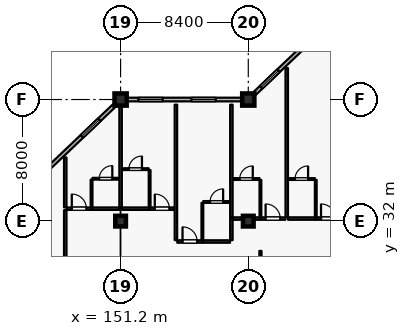
"""IFC4 building model, lengths in metres.
Left out: names, types, materials, properties, quantities, classifications, styles, units other than length and angle.
Written with IfcOpenShell. Run it as: python <this file> out.ifc"""

import sys

from ifc_helpers import new_model, si_unit, direction, frame, frame_2d, origin, origin_2d, place, context, subcontext, project, spatial, rectangle, extrude, element, fill, save


model = new_model("IFC4")
c1 = context("Model", 3, precision=1e-05, world=origin(), true_north=direction((0.0, 1.0)))
c2 = subcontext(c1, "Body", "Model", "MODEL_VIEW")
j1 = project(units=[si_unit("LENGTHUNIT", "METRE"), si_unit("PLANEANGLEUNIT", "RADIAN")], contexts=[c1])
p1 = place(None, origin())
s1 = spatial("IfcSite", under=j1, at=p1, CompositionType="ELEMENT")
p2 = place(p1, origin())
s2 = spatial("IfcBuilding", under=s1, at=p2, CompositionType="ELEMENT")
p3 = place(p2, frame((0.0, 0.0, 11.4)))
s3 = spatial("IfcBuildingStorey", under=s2, at=p3, CompositionType="ELEMENT", Elevation=11.4)
for number, where, z_axis, x_axis in (
    (1, (151.2, 40.0, 0.0), (0.0, 0.0, 1.0), (1.0, 0.0, 0.0)),
    (2, (159.6, 40.0, 0.0), (0.0, 0.0, 1.0), (1.0, 0.0, 0.0)),
):
    element("IfcColumn", number, at=place(p3, frame(where, z_axis=z_axis, x_axis=x_axis)), inside=s3, PredefinedType="COLUMN", context=c2, shape_type="SweptSolid", body=[
        extrude(rectangle(XDim=0.8, YDim=0.8, at=origin_2d()), origin(), (0.0, 0.0, 1.0), 4.8),
    ])
for number, where, z_axis, x_axis in (
    (3, (151.2, 32.0, 0.0), (0.0, 0.0, 1.0), (1.0, 0.0, 0.0)),
    (4, (159.6, 32.0, 0.0), (0.0, 0.0, 1.0), (1.0, 0.0, 0.0)),
):
    element("IfcColumn", number, at=place(p3, frame(where, z_axis=z_axis, x_axis=x_axis)), inside=s3, PredefinedType="COLUMN", context=c2, shape_type="SweptSolid", body=[
        extrude(rectangle(XDim=0.7, YDim=0.7, at=origin_2d()), origin(), (0.0, 0.0, 1.0), 4.8),
    ])
p4 = place(p3, frame((143.2, 32.381, 0.0), z_axis=(0.0, 0.0, 1.0), x_axis=(0.724156739794, 0.689635422677, 0.0)))
e5 = element("IfcWall", 5, at=p4, inside=s3, PredefinedType="SOLIDWALL", context=c2, shape_type="SweptSolid", body=[
    extrude(rectangle(XDim=10.495, YDim=0.24, at=frame_2d((5.248, 0.0))), origin(), (0.0, 0.0, 1.0), 4.13),
])
p5 = place(p4, frame((2.701, 0.0, 0.8)))
e6 = element("IfcOpeningElement", 6, at=p5, cuts=e5, PredefinedType="OPENING", context=c2, shape_type="SweptSolid", body=[
    extrude(rectangle(XDim=1.6, YDim=1.6, at=frame_2d((0.8, 0.8))), frame((0.0, 0.13, 0.0), z_axis=(0.0, -1.0, 0.0), x_axis=(1.0, 0.0, 0.0)), (0.0, 0.0, 1.0), 0.26),
])
p6 = place(p4, frame((7.527, 0.0, 0.8)))
e7 = element("IfcOpeningElement", 7, at=p6, cuts=e5, PredefinedType="OPENING", context=c2, shape_type="SweptSolid", body=[
    extrude(rectangle(XDim=1.6, YDim=1.6, at=frame_2d((0.8, 0.8))), frame((0.0, 0.13, 0.0), z_axis=(0.0, -1.0, 0.0), x_axis=(1.0, 0.0, 0.0)), (0.0, 0.0, 1.0), 0.26),
])
p7 = place(p3, frame((151.6, 40.0, 0.0), z_axis=(0.0, 0.0, 1.0), x_axis=(1.0, 0.0, 0.0)))
e8 = element("IfcWall", 8, at=p7, inside=s3, PredefinedType="SOLIDWALL", context=c2, shape_type="SweptSolid", body=[
    extrude(rectangle(XDim=7.6, YDim=0.24, at=frame_2d((3.8, 0.0))), origin(), (0.0, 0.0, 1.0), 4.13),
])
p8 = place(p7, frame((0.77, 0.0, 0.8)))
e9 = element("IfcOpeningElement", 9, at=p8, cuts=e8, PredefinedType="OPENING", context=c2, shape_type="SweptSolid", body=[
    extrude(rectangle(XDim=1.6, YDim=1.6, at=frame_2d((0.8, 0.8))), frame((0.0, 0.13, 0.0), z_axis=(0.0, -1.0, 0.0), x_axis=(1.0, 0.0, 0.0)), (0.0, 0.0, 1.0), 0.26),
])
p9 = place(p7, frame((4.265, 0.0, 0.8)))
e10 = element("IfcOpeningElement", 10, at=p9, cuts=e8, PredefinedType="OPENING", context=c2, shape_type="SweptSolid", body=[
    extrude(rectangle(XDim=1.6, YDim=1.6, at=frame_2d((0.8, 0.8))), frame((0.0, 0.13, 0.0), z_axis=(0.0, -1.0, 0.0), x_axis=(1.0, 0.0, 0.0)), (0.0, 0.0, 1.0), 0.26),
])
p10 = place(p3, frame((160.0, 40.381, 0.0), z_axis=(0.0, 0.0, 1.0), x_axis=(0.724156739794, 0.689635422677, 0.0)))
e11 = element("IfcWall", 11, at=p10, inside=s3, PredefinedType="SOLIDWALL", context=c2, shape_type="SweptSolid", body=[
    extrude(rectangle(XDim=10.495, YDim=0.24, at=frame_2d((5.248, 0.0))), origin(), (0.0, 0.0, 1.0), 4.13),
])
p11 = place(p10, frame((0.602, 0.0, 0.8)))
e12 = element("IfcOpeningElement", 12, at=p11, cuts=e11, PredefinedType="OPENING", context=c2, shape_type="SweptSolid", body=[
    extrude(rectangle(XDim=1.6, YDim=1.6, at=frame_2d((0.8, 0.8))), frame((0.0, 0.13, 0.0), z_axis=(0.0, -1.0, 0.0), x_axis=(1.0, 0.0, 0.0)), (0.0, 0.0, 1.0), 0.26),
])
p12 = place(p10, frame((4.662, 0.0, 0.8)))
e13 = element("IfcOpeningElement", 13, at=p12, cuts=e11, PredefinedType="OPENING", context=c2, shape_type="SweptSolid", body=[
    extrude(rectangle(XDim=1.6, YDim=1.6, at=frame_2d((0.8, 0.8))), frame((0.0, 0.13, 0.0), z_axis=(0.0, -1.0, 0.0), x_axis=(1.0, 0.0, 0.0)), (0.0, 0.0, 1.0), 0.26),
])
p13 = place(p10, frame((8.508, 0.0, 0.8)))
e14 = element("IfcOpeningElement", 14, at=p13, cuts=e11, PredefinedType="OPENING", context=c2, shape_type="SweptSolid", body=[
    extrude(rectangle(XDim=1.6, YDim=1.6, at=frame_2d((0.8, 0.8))), frame((0.0, 0.13, 0.0), z_axis=(0.0, -1.0, 0.0), x_axis=(1.0, 0.0, 0.0)), (0.0, 0.0, 1.0), 0.26),
])
p14 = place(p3, frame((147.56, 28.46, 0.0), z_axis=(0.0, 0.0, 1.0), x_axis=(0.0, 1.0, 0.0)))
e15 = element("IfcWall", 15, at=p14, inside=s3, PredefinedType="PARTITIONING", context=c2, shape_type="SweptSolid", body=[
    extrude(rectangle(XDim=4.26, YDim=0.16, at=frame_2d((2.13, 0.0))), origin(), (0.0, 0.0, 1.0), 4.535),
])
p15 = place(p3, frame((147.65, 32.82, 0.0), z_axis=(0.0, 0.0, 1.0), x_axis=(1.0, 0.0, 0.0)))
e16 = element("IfcWall", 16, at=p15, inside=s3, PredefinedType="PARTITIONING", context=c2, shape_type="SweptSolid", body=[
    extrude(rectangle(XDim=1.64, YDim=0.16, at=frame_2d((0.82, 0.0))), origin(), (0.0, 0.0, 1.0), 4.535),
])
p16 = place(p15, frame((0.34, 0.0, 0.0)))
e17 = element("IfcOpeningElement", 17, at=p16, cuts=e16, PredefinedType="OPENING", context=c2, shape_type="SweptSolid", body=[
    extrude(rectangle(XDim=0.96, YDim=2.2, at=frame_2d((0.48, 1.1))), frame((0.0, 0.09, 0.0), z_axis=(0.0, -1.0, 0.0), x_axis=(1.0, 0.0, 0.0)), (0.0, 0.0, 1.0), 0.18),
])
p17 = place(p3, frame((149.3, 32.82, 0.0), z_axis=(0.0, 0.0, 1.0), x_axis=(1.0, 0.0, 0.0)))
e18 = element("IfcWall", 18, at=p17, inside=s3, PredefinedType="PARTITIONING", context=c2, shape_type="SweptSolid", body=[
    extrude(rectangle(XDim=1.81, YDim=0.16, at=frame_2d((0.905, 0.0))), origin(), (0.0, 0.0, 1.0), 4.535),
])
p18 = place(p3, frame((149.29, 32.91, 0.0), z_axis=(0.0, 0.0, 1.0), x_axis=(0.0, 1.0, 0.0)))
e19 = element("IfcWall", 19, at=p18, inside=s3, PredefinedType="PARTITIONING", context=c2, shape_type="SweptSolid", body=[
    extrude(rectangle(XDim=1.82, YDim=0.115, at=frame_2d((0.91, 0.0))), origin(), (0.0, 0.0, 1.0), 4.535),
])
p19 = place(p3, frame((149.35, 34.79, 0.0), z_axis=(0.0, 0.0, 1.0), x_axis=(1.0, 0.0, 0.0)))
e20 = element("IfcWall", 20, at=p19, inside=s3, PredefinedType="PARTITIONING", context=c2, shape_type="SweptSolid", body=[
    extrude(rectangle(XDim=1.75, YDim=0.115, at=frame_2d((0.875, 0.0))), origin(), (0.0, 0.0, 1.0), 4.535),
])
p20 = place(p19, frame((0.445, 0.0, 0.0)))
e21 = element("IfcOpeningElement", 21, at=p20, cuts=e20, PredefinedType="OPENING", context=c2, shape_type="SweptSolid", body=[
    extrude(rectangle(XDim=0.86, YDim=2.12, at=frame_2d((0.43, 1.06))), frame((0.0, 0.067, 0.0), z_axis=(0.0, -1.0, 0.0), x_axis=(1.0, 0.0, 0.0)), (0.0, 0.0, 1.0), 0.135),
])
p21 = place(p3, frame((147.56, 32.91, 0.0), z_axis=(0.0, 0.0, 1.0), x_axis=(0.0, 1.0, 0.0)))
e22 = element("IfcWall", 22, at=p21, inside=s3, PredefinedType="PARTITIONING", context=c2, shape_type="SweptSolid", body=[
    extrude(rectangle(XDim=3.28, YDim=0.16, at=frame_2d((1.64, 0.0))), origin(), (0.0, 0.0, 1.0), 4.535),
])
p22 = place(p3, frame((151.29, 32.82, 0.0), z_axis=(0.0, 0.0, 1.0), x_axis=(1.0, 0.0, 0.0)))
e23 = element("IfcWall", 23, at=p22, inside=s3, PredefinedType="PARTITIONING", context=c2, shape_type="SweptSolid", body=[
    extrude(rectangle(XDim=1.81, YDim=0.16, at=frame_2d((0.905, 0.0))), origin(), (0.0, 0.0, 1.0), 4.535),
])
p23 = place(p3, frame((153.11, 32.82, 0.0), z_axis=(0.0, 0.0, 1.0), x_axis=(1.0, 0.0, 0.0)))
e24 = element("IfcWall", 24, at=p23, inside=s3, PredefinedType="PARTITIONING", context=c2, shape_type="SweptSolid", body=[
    extrude(rectangle(XDim=1.64, YDim=0.16, at=frame_2d((0.82, 0.0))), origin(), (0.0, 0.0, 1.0), 4.535),
])
p24 = place(p23, frame((0.34, 0.0, 0.0)))
e25 = element("IfcOpeningElement", 25, at=p24, cuts=e24, PredefinedType="OPENING", context=c2, shape_type="SweptSolid", body=[
    extrude(rectangle(XDim=0.96, YDim=2.2, at=frame_2d((0.48, 1.1))), frame((0.0, 0.09, 0.0), z_axis=(0.0, -1.0, 0.0), x_axis=(1.0, 0.0, 0.0)), (0.0, 0.0, 1.0), 0.18),
])
p25 = place(p3, frame((153.11, 32.91, 0.0), z_axis=(0.0, 0.0, 1.0), x_axis=(0.0, 1.0, 0.0)))
e26 = element("IfcWall", 26, at=p25, inside=s3, PredefinedType="PARTITIONING", context=c2, shape_type="SweptSolid", body=[
    extrude(rectangle(XDim=2.45, YDim=0.115, at=frame_2d((1.225, 0.0))), origin(), (0.0, 0.0, 1.0), 4.535),
])
p26 = place(p3, frame((151.3, 35.42, 0.0), z_axis=(0.0, 0.0, 1.0), x_axis=(1.0, 0.0, 0.0)))
e27 = element("IfcWall", 27, at=p26, inside=s3, PredefinedType="PARTITIONING", context=c2, shape_type="SweptSolid", body=[
    extrude(rectangle(XDim=1.75, YDim=0.115, at=frame_2d((0.875, 0.0))), origin(), (0.0, 0.0, 1.0), 4.535),
])
p27 = place(p26, frame((0.445, 0.0, 0.0)))
e28 = element("IfcOpeningElement", 28, at=p27, cuts=e27, PredefinedType="OPENING", context=c2, shape_type="SweptSolid", body=[
    extrude(rectangle(XDim=0.86, YDim=2.12, at=frame_2d((0.43, 1.06))), frame((0.0, 0.067, 0.0), z_axis=(0.0, -1.0, 0.0), x_axis=(1.0, 0.0, 0.0)), (0.0, 0.0, 1.0), 0.135),
])
p28 = place(p3, frame((151.2, 32.91, 0.0), z_axis=(0.0, 0.0, 1.0), x_axis=(0.0, 1.0, 0.0)))
e29 = element("IfcWall", 29, at=p28, inside=s3, PredefinedType="PARTITIONING", context=c2, shape_type="SweptSolid", body=[
    extrude(rectangle(XDim=6.75, YDim=0.16, at=frame_2d((3.375, 0.0))), origin(), (0.0, 0.0, 1.0), 3.98),
])
p29 = place(p3, frame((154.93, 30.66, 0.0), z_axis=(0.0, 0.0, 1.0), x_axis=(1.0, 0.0, 0.0)))
e30 = element("IfcWall", 30, at=p29, inside=s3, PredefinedType="PARTITIONING", context=c2, shape_type="SweptSolid", body=[
    extrude(rectangle(XDim=1.65, YDim=0.16, at=frame_2d((0.825, 0.0))), origin(), (0.0, 0.0, 1.0), 4.535),
])
p30 = place(p29, frame((0.345, 0.0, 0.0)))
e31 = element("IfcOpeningElement", 31, at=p30, cuts=e30, PredefinedType="OPENING", context=c2, shape_type="SweptSolid", body=[
    extrude(rectangle(XDim=0.96, YDim=2.2, at=frame_2d((0.48, 1.1))), frame((0.0, 0.09, 0.0), z_axis=(0.0, -1.0, 0.0), x_axis=(1.0, 0.0, 0.0)), (0.0, 0.0, 1.0), 0.18),
])
p31 = place(p3, frame((156.59, 30.66, 0.0), z_axis=(0.0, 0.0, 1.0), x_axis=(1.0, 0.0, 0.0)))
e32 = element("IfcWall", 32, at=p31, inside=s3, PredefinedType="PARTITIONING", context=c2, shape_type="SweptSolid", body=[
    extrude(rectangle(XDim=1.81, YDim=0.16, at=frame_2d((0.905, 0.0))), origin(), (0.0, 0.0, 1.0), 4.535),
])
p32 = place(p3, frame((156.58, 30.75, 0.0), z_axis=(0.0, 0.0, 1.0), x_axis=(0.0, 1.0, 0.0)))
e33 = element("IfcWall", 33, at=p32, inside=s3, PredefinedType="PARTITIONING", context=c2, shape_type="SweptSolid", body=[
    extrude(rectangle(XDim=2.45, YDim=0.115, at=frame_2d((1.225, 0.0))), origin(), (0.0, 0.0, 1.0), 4.535),
])
p33 = place(p3, frame((156.64, 33.26, 0.0), z_axis=(0.0, 0.0, 1.0), x_axis=(1.0, 0.0, 0.0)))
e34 = element("IfcWall", 34, at=p33, inside=s3, PredefinedType="PARTITIONING", context=c2, shape_type="SweptSolid", body=[
    extrude(rectangle(XDim=1.75, YDim=0.115, at=frame_2d((0.875, 0.0))), origin(), (0.0, 0.0, 1.0), 4.535),
])
p34 = place(p33, frame((0.445, 0.0, 0.0)))
e35 = element("IfcOpeningElement", 35, at=p34, cuts=e34, PredefinedType="OPENING", context=c2, shape_type="SweptSolid", body=[
    extrude(rectangle(XDim=0.86, YDim=2.12, at=frame_2d((0.43, 1.06))), frame((0.0, 0.067, 0.0), z_axis=(0.0, -1.0, 0.0), x_axis=(1.0, 0.0, 0.0)), (0.0, 0.0, 1.0), 0.135),
])
p35 = place(p3, frame((154.84, 30.75, 0.0), z_axis=(0.0, 0.0, 1.0), x_axis=(0.0, 1.0, 0.0)))
e36 = element("IfcWall", 36, at=p35, inside=s3, PredefinedType="PARTITIONING", context=c2, shape_type="SweptSolid", body=[
    extrude(rectangle(XDim=8.91, YDim=0.16, at=frame_2d((4.455, 0.0))), origin(), (0.0, 0.0, 1.0), 4.535),
])
p36 = place(p3, frame((158.49, 30.75, 0.0), z_axis=(0.0, 0.0, 1.0), x_axis=(0.0, 1.0, 0.0)))
e37 = element("IfcWall", 37, at=p36, inside=s3, PredefinedType="PARTITIONING", context=c2, shape_type="SweptSolid", body=[
    extrude(rectangle(XDim=1.5, YDim=0.16, at=frame_2d((0.75, 0.0))), origin(), (0.0, 0.0, 1.0), 4.535),
])
p37 = place(p3, frame((158.58, 32.17, 0.0), z_axis=(0.0, 0.0, 1.0), x_axis=(1.0, 0.0, 0.0)))
e38 = element("IfcWall", 38, at=p37, inside=s3, PredefinedType="PARTITIONING", context=c2, shape_type="SweptSolid", body=[
    extrude(rectangle(XDim=0.674, YDim=0.16, at=frame_2d((0.337, 0.0))), origin(), (0.0, 0.0, 1.0), 4.03),
])
p38 = place(p3, frame((160.4, 32.17, 0.0), z_axis=(0.0, 0.0, 1.0), x_axis=(1.0, 0.0, 0.0)))
e39 = element("IfcWall", 39, at=p38, inside=s3, PredefinedType="PARTITIONING", context=c2, shape_type="SweptSolid", body=[
    extrude(rectangle(XDim=1.64, YDim=0.16, at=frame_2d((0.82, 0.0))), origin(), (0.0, 0.0, 1.0), 4.535),
])
p39 = place(p38, frame((0.34, 0.0, 0.0)))
e40 = element("IfcOpeningElement", 40, at=p39, cuts=e39, PredefinedType="OPENING", context=c2, shape_type="SweptSolid", body=[
    extrude(rectangle(XDim=0.96, YDim=2.2, at=frame_2d((0.48, 1.1))), frame((0.0, 0.09, 0.0), z_axis=(0.0, -1.0, 0.0), x_axis=(1.0, 0.0, 0.0)), (0.0, 0.0, 1.0), 0.18),
])
p40 = place(p3, frame((160.4, 32.26, 0.0), z_axis=(0.0, 0.0, 1.0), x_axis=(0.0, 1.0, 0.0)))
e41 = element("IfcWall", 41, at=p40, inside=s3, PredefinedType="PARTITIONING", context=c2, shape_type="SweptSolid", body=[
    extrude(rectangle(XDim=2.45, YDim=0.115, at=frame_2d((1.225, 0.0))), origin(), (0.0, 0.0, 1.0), 4.535),
])
p41 = place(p3, frame((158.59, 34.77, 0.0), z_axis=(0.0, 0.0, 1.0), x_axis=(1.0, 0.0, 0.0)))
e42 = element("IfcWall", 42, at=p41, inside=s3, PredefinedType="PARTITIONING", context=c2, shape_type="SweptSolid", body=[
    extrude(rectangle(XDim=1.75, YDim=0.115, at=frame_2d((0.875, 0.0))), origin(), (0.0, 0.0, 1.0), 4.535),
])
p42 = place(p41, frame((0.445, 0.0, 0.0)))
e43 = element("IfcOpeningElement", 43, at=p42, cuts=e42, PredefinedType="OPENING", context=c2, shape_type="SweptSolid", body=[
    extrude(rectangle(XDim=0.86, YDim=2.12, at=frame_2d((0.43, 1.06))), frame((0.0, 0.067, 0.0), z_axis=(0.0, -1.0, 0.0), x_axis=(1.0, 0.0, 0.0)), (0.0, 0.0, 1.0), 0.135),
])
p43 = place(p3, frame((158.49, 32.26, 0.0), z_axis=(0.0, 0.0, 1.0), x_axis=(0.0, 1.0, 0.0)))
e44 = element("IfcWall", 44, at=p43, inside=s3, PredefinedType="PARTITIONING", context=c2, shape_type="SweptSolid", body=[
    extrude(rectangle(XDim=7.4, YDim=0.16, at=frame_2d((3.7, 0.0))), origin(), (0.0, 0.0, 1.0), 4.535),
])
p44 = place(p3, frame((162.22, 32.17, 0.0), z_axis=(0.0, 0.0, 1.0), x_axis=(1.0, 0.0, 0.0)))
e45 = element("IfcWall", 45, at=p44, inside=s3, PredefinedType="PARTITIONING", context=c2, shape_type="SweptSolid", body=[
    extrude(rectangle(XDim=1.81, YDim=0.16, at=frame_2d((0.905, 0.0))), origin(), (0.0, 0.0, 1.0), 4.535),
])
p45 = place(p3, frame((164.04, 32.17, 0.0), z_axis=(0.0, 0.0, 1.0), x_axis=(1.0, 0.0, 0.0)))
e46 = element("IfcWall", 46, at=p45, inside=s3, PredefinedType="PARTITIONING", context=c2, shape_type="SweptSolid", body=[
    extrude(rectangle(XDim=1.65, YDim=0.16, at=frame_2d((0.825, 0.0))), origin(), (0.0, 0.0, 1.0), 4.535),
])
p46 = place(p45, frame((0.345, 0.0, 0.0)))
e47 = element("IfcOpeningElement", 47, at=p46, cuts=e46, PredefinedType="OPENING", context=c2, shape_type="SweptSolid", body=[
    extrude(rectangle(XDim=0.96, YDim=2.2, at=frame_2d((0.48, 1.1))), frame((0.0, 0.09, 0.0), z_axis=(0.0, -1.0, 0.0), x_axis=(1.0, 0.0, 0.0)), (0.0, 0.0, 1.0), 0.18),
])
p47 = place(p3, frame((164.04, 32.26, 0.0), z_axis=(0.0, 0.0, 1.0), x_axis=(0.0, 1.0, 0.0)))
e48 = element("IfcWall", 48, at=p47, inside=s3, PredefinedType="PARTITIONING", context=c2, shape_type="SweptSolid", body=[
    extrude(rectangle(XDim=2.45, YDim=0.115, at=frame_2d((1.225, 0.0))), origin(), (0.0, 0.0, 1.0), 4.535),
])
p48 = place(p3, frame((162.23, 34.77, 0.0), z_axis=(0.0, 0.0, 1.0), x_axis=(1.0, 0.0, 0.0)))
e49 = element("IfcWall", 49, at=p48, inside=s3, PredefinedType="PARTITIONING", context=c2, shape_type="SweptSolid", body=[
    extrude(rectangle(XDim=1.75, YDim=0.115, at=frame_2d((0.875, 0.0))), origin(), (0.0, 0.0, 1.0), 4.535),
])
p49 = place(p48, frame((0.445, 0.0, 0.0)))
e50 = element("IfcOpeningElement", 50, at=p49, cuts=e49, PredefinedType="OPENING", context=c2, shape_type="SweptSolid", body=[
    extrude(rectangle(XDim=0.86, YDim=2.12, at=frame_2d((0.43, 1.06))), frame((0.0, 0.067, 0.0), z_axis=(0.0, -1.0, 0.0), x_axis=(1.0, 0.0, 0.0)), (0.0, 0.0, 1.0), 0.135),
])
p50 = place(p3, frame((162.13, 32.26, 0.0), z_axis=(0.0, 0.0, 1.0), x_axis=(0.0, 1.0, 0.0)))
e51 = element("IfcWall", 51, at=p50, inside=s3, PredefinedType="PARTITIONING", context=c2, shape_type="SweptSolid", body=[
    extrude(rectangle(XDim=9.81, YDim=0.16, at=frame_2d((4.905, 0.0))), origin(), (0.0, 0.0, 1.0), 4.535),
])
p51 = place(p3, frame((160.4, 24.96, 0.0), z_axis=(0.0, 0.0, 1.0), x_axis=(0.0, 1.0, 0.0)))
e52 = element("IfcWall", 52, at=p51, inside=s3, PredefinedType="PARTITIONING", context=c2, shape_type="SweptSolid", body=[
    extrude(rectangle(XDim=5.08, YDim=0.14, at=frame_2d((2.54, 0.0))), origin(), (0.0, 0.0, 1.0), 4.535),
])
p52 = place(p51, frame((1.59, 0.0, 0.0)))
e53 = element("IfcOpeningElement", 53, at=p52, cuts=e52, PredefinedType="OPENING", context=c2, shape_type="SweptSolid", body=[
    extrude(rectangle(XDim=1.9, YDim=2.4, at=frame_2d((0.95, 1.2))), frame((0.0, 0.08, 0.0), z_axis=(0.0, -1.0, 0.0), x_axis=(1.0, 0.0, 0.0)), (0.0, 0.0, 1.0), 0.16),
])
p53 = place(p3, frame((159.254, 32.17, 0.0), z_axis=(0.0, 0.0, 1.0), x_axis=(1.0, 0.0, 0.0)))
e54 = element("IfcWall", 54, at=p53, inside=s3, PredefinedType="PARTITIONING", context=c2, shape_type="SweptSolid", body=[
    extrude(rectangle(XDim=1.136, YDim=0.16, at=frame_2d((0.568, 0.0))), origin(), (0.0, 0.0, 1.0), 4.535),
])
p54 = place(p6, origin())
e55 = element("IfcWindow", 55, at=p54, inside=s3, PartitioningType="SINGLE_PANEL", PredefinedType="WINDOW", context=c2, shape_type="SweptSolid", body=[
    extrude(rectangle(XDim=1.6, YDim=1.6, at=frame_2d((0.8, 0.8))), frame((0.0, 0.03, 0.0), z_axis=(0.0, -1.0, 0.0), x_axis=(1.0, 0.0, 0.0)), (0.0, 0.0, 1.0), 0.06),
])
fill(e7, e55)
p55 = place(p8, origin())
e56 = element("IfcWindow", 56, at=p55, inside=s3, PartitioningType="SINGLE_PANEL", PredefinedType="WINDOW", context=c2, shape_type="SweptSolid", body=[
    extrude(rectangle(XDim=1.6, YDim=1.6, at=frame_2d((0.8, 0.8))), frame((0.0, 0.03, 0.0), z_axis=(0.0, -1.0, 0.0), x_axis=(1.0, 0.0, 0.0)), (0.0, 0.0, 1.0), 0.06),
])
fill(e9, e56)
p56 = place(p9, origin())
e57 = element("IfcWindow", 57, at=p56, inside=s3, PartitioningType="SINGLE_PANEL", PredefinedType="WINDOW", context=c2, shape_type="SweptSolid", body=[
    extrude(rectangle(XDim=1.6, YDim=1.6, at=frame_2d((0.8, 0.8))), frame((0.0, 0.03, 0.0), z_axis=(0.0, -1.0, 0.0), x_axis=(1.0, 0.0, 0.0)), (0.0, 0.0, 1.0), 0.06),
])
fill(e10, e57)
p57 = place(p11, origin())
e58 = element("IfcWindow", 58, at=p57, inside=s3, PartitioningType="SINGLE_PANEL", PredefinedType="WINDOW", context=c2, shape_type="SweptSolid", body=[
    extrude(rectangle(XDim=1.6, YDim=1.6, at=frame_2d((0.8, 0.8))), frame((0.0, 0.03, 0.0), z_axis=(0.0, -1.0, 0.0), x_axis=(1.0, 0.0, 0.0)), (0.0, 0.0, 1.0), 0.06),
])
fill(e12, e58)
p58 = place(p16, origin())
e59 = element("IfcDoor", 59, at=p58, inside=s3, OperationType="SINGLE_SWING_LEFT", PredefinedType="DOOR", context=c2, shape_type="SweptSolid", body=[
    extrude(rectangle(XDim=0.96, YDim=2.2, at=frame_2d((0.48, 1.1))), frame((0.0, 0.025, 0.0), z_axis=(0.0, -1.0, 0.0), x_axis=(1.0, 0.0, 0.0)), (0.0, 0.0, 1.0), 0.05),
])
fill(e17, e59)
p59 = place(p20, origin())
e60 = element("IfcDoor", 60, at=p59, inside=s3, OperationType="SINGLE_SWING_RIGHT", PredefinedType="DOOR", context=c2, shape_type="SweptSolid", body=[
    extrude(rectangle(XDim=0.86, YDim=2.12, at=frame_2d((0.43, 1.06))), frame((0.0, 0.025, 0.0), z_axis=(0.0, -1.0, 0.0), x_axis=(1.0, 0.0, 0.0)), (0.0, 0.0, 1.0), 0.05),
])
fill(e21, e60)
p60 = place(p24, origin())
e61 = element("IfcDoor", 61, at=p60, inside=s3, OperationType="SINGLE_SWING_LEFT", PredefinedType="DOOR", context=c2, shape_type="SweptSolid", body=[
    extrude(rectangle(XDim=0.96, YDim=2.2, at=frame_2d((0.48, 1.1))), frame((0.0, 0.025, 0.0), z_axis=(0.0, -1.0, 0.0), x_axis=(1.0, 0.0, 0.0)), (0.0, 0.0, 1.0), 0.05),
])
fill(e25, e61)
p61 = place(p27, origin())
e62 = element("IfcDoor", 62, at=p61, inside=s3, OperationType="SINGLE_SWING_RIGHT", PredefinedType="DOOR", context=c2, shape_type="SweptSolid", body=[
    extrude(rectangle(XDim=0.86, YDim=2.12, at=frame_2d((0.43, 1.06))), frame((0.0, 0.025, 0.0), z_axis=(0.0, -1.0, 0.0), x_axis=(1.0, 0.0, 0.0)), (0.0, 0.0, 1.0), 0.05),
])
fill(e28, e62)
p62 = place(p30, origin())
e63 = element("IfcDoor", 63, at=p62, inside=s3, OperationType="SINGLE_SWING_LEFT", PredefinedType="DOOR", context=c2, shape_type="SweptSolid", body=[
    extrude(rectangle(XDim=0.96, YDim=2.2, at=frame_2d((0.48, 1.1))), frame((0.0, 0.025, 0.0), z_axis=(0.0, -1.0, 0.0), x_axis=(1.0, 0.0, 0.0)), (0.0, 0.0, 1.0), 0.05),
])
fill(e31, e63)
p63 = place(p34, origin())
e64 = element("IfcDoor", 64, at=p63, inside=s3, OperationType="SINGLE_SWING_RIGHT", PredefinedType="DOOR", context=c2, shape_type="SweptSolid", body=[
    extrude(rectangle(XDim=0.86, YDim=2.12, at=frame_2d((0.43, 1.06))), frame((0.0, 0.025, 0.0), z_axis=(0.0, -1.0, 0.0), x_axis=(1.0, 0.0, 0.0)), (0.0, 0.0, 1.0), 0.05),
])
fill(e35, e64)
p64 = place(p39, origin())
e65 = element("IfcDoor", 65, at=p64, inside=s3, OperationType="SINGLE_SWING_LEFT", PredefinedType="DOOR", context=c2, shape_type="SweptSolid", body=[
    extrude(rectangle(XDim=0.96, YDim=2.2, at=frame_2d((0.48, 1.1))), frame((0.0, 0.025, 0.0), z_axis=(0.0, -1.0, 0.0), x_axis=(1.0, 0.0, 0.0)), (0.0, 0.0, 1.0), 0.05),
])
fill(e40, e65)
p65 = place(p42, origin())
e66 = element("IfcDoor", 66, at=p65, inside=s3, OperationType="SINGLE_SWING_RIGHT", PredefinedType="DOOR", context=c2, shape_type="SweptSolid", body=[
    extrude(rectangle(XDim=0.86, YDim=2.12, at=frame_2d((0.43, 1.06))), frame((0.0, 0.025, 0.0), z_axis=(0.0, -1.0, 0.0), x_axis=(1.0, 0.0, 0.0)), (0.0, 0.0, 1.0), 0.05),
])
fill(e43, e66)
p66 = place(p46, origin())
e67 = element("IfcDoor", 67, at=p66, inside=s3, OperationType="SINGLE_SWING_LEFT", PredefinedType="DOOR", context=c2, shape_type="SweptSolid", body=[
    extrude(rectangle(XDim=0.96, YDim=2.2, at=frame_2d((0.48, 1.1))), frame((0.0, 0.025, 0.0), z_axis=(0.0, -1.0, 0.0), x_axis=(1.0, 0.0, 0.0)), (0.0, 0.0, 1.0), 0.05),
])
fill(e47, e67)
p67 = place(p49, origin())
e68 = element("IfcDoor", 68, at=p67, inside=s3, OperationType="SINGLE_SWING_RIGHT", PredefinedType="DOOR", context=c2, shape_type="SweptSolid", body=[
    extrude(rectangle(XDim=0.86, YDim=2.12, at=frame_2d((0.43, 1.06))), frame((0.0, 0.025, 0.0), z_axis=(0.0, -1.0, 0.0), x_axis=(1.0, 0.0, 0.0)), (0.0, 0.0, 1.0), 0.05),
])
fill(e50, e68)
save(model, sys.argv[1])
